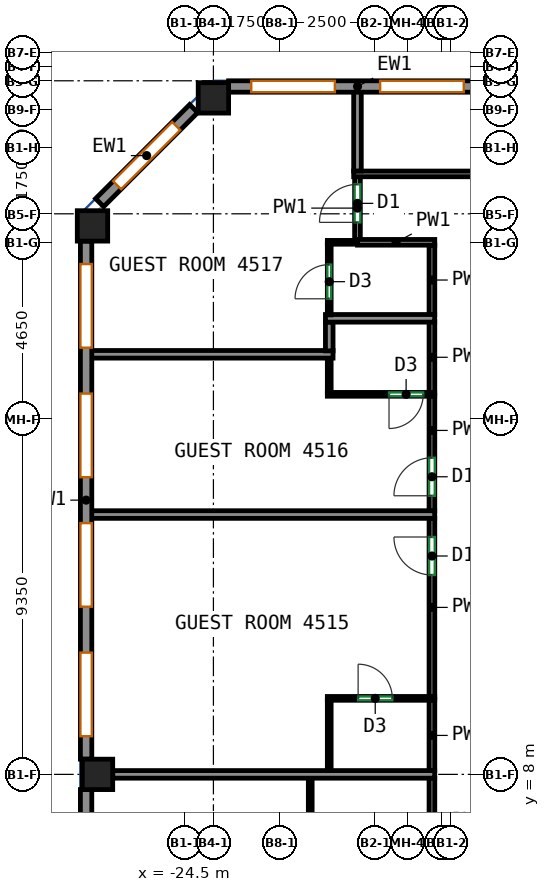
"""IFC4 building model, lengths in metres.
Left out: names, types, materials, properties, quantities, classifications, styles, units other than length and angle.
Written with IfcOpenShell. Run it as: python <this file> out.ifc"""

import sys

from ifc_helpers import new_model, si_unit, direction, frame, frame_2d, origin, origin_2d, place, context, subcontext, project, spatial, rectangle, extrude, source, transform, mapped, element, fill, save


model = new_model("IFC4")
c1 = context("Model", 3, precision=1e-05, world=origin(), true_north=direction((0.0, 1.0)))
c2 = subcontext(c1, "Body", "Model", "MODEL_VIEW")
j1 = project(units=[si_unit("LENGTHUNIT", "METRE"), si_unit("PLANEANGLEUNIT", "RADIAN")], contexts=[c1])
p1 = place(None, origin())
s1 = spatial("IfcSite", under=j1, at=p1, CompositionType="ELEMENT")
p2 = place(p1, origin())
s2 = spatial("IfcBuilding", under=s1, at=p2, CompositionType="ELEMENT")
p3 = place(p2, frame((0.0, 0.0, 188.9)))
s3 = spatial("IfcBuildingStorey", under=s2, at=p3, CompositionType="ELEMENT", Elevation=188.9)
m1 = source(origin(), c2, "Body", "SweptSolid", [
    extrude(rectangle(XDim=0.8, YDim=0.8, at=origin_2d()), origin(), (0.0, 0.0, 1.0), 3.12),
])
for number, where, z_axis, x_axis in (
    (1, (-26.932, 22.432, 0.0), (0.0, 0.0, 1.0), (1.0, 0.0, 0.0)),
    (2, (-26.8, 8.0, 0.0), (0.0, 0.0, 1.0), (1.0, 0.0, 0.0)),
    (3, (-23.75, 25.8, 0.0), (0.0, 0.0, 1.0), (1.0, 0.0, 0.0)),
):
    element("IfcColumn", number, at=place(p3, frame(where, z_axis=z_axis, x_axis=x_axis)), inside=s3, PredefinedType="COLUMN", context=c2, shape_type="MappedRepresentation", body=[
        mapped(m1, transform((0.0, 0.0, 0.0))),
    ])
m2 = source(origin(), c2, "Body", "SweptSolid", [
    extrude(rectangle(XDim=6.783, YDim=0.3, at=frame_2d((3.392, 0.0))), origin(), (0.0, 0.0, 1.0), 3.12),
])
p4 = place(p3, frame((-16.567, 26.1, 0.0), z_axis=(0.0, 0.0, 1.0), x_axis=(-1.0, 0.0, 0.0)))
e4 = element("IfcWall", 4, at=p4, inside=s3, PredefinedType="SOLIDWALL", context=c2, shape_type="MappedRepresentation", body=[
    mapped(m2, transform((0.0, 0.0, 0.0))),
])
p5 = place(p4, frame((0.596, 0.0, 0.85)))
e5 = element("IfcOpeningElement", 5, at=p5, cuts=e4, PredefinedType="OPENING", context=c2, shape_type="SweptSolid", body=[
    extrude(rectangle(XDim=2.2, YDim=1.95, at=frame_2d((1.1, 0.975))), frame((0.0, 0.16, 0.0), z_axis=(0.0, -1.0, 0.0), x_axis=(1.0, 0.0, 0.0)), (0.0, 0.0, 1.0), 0.32),
])
p6 = place(p4, frame((3.988, 0.0, 0.85)))
e6 = element("IfcOpeningElement", 6, at=p6, cuts=e4, PredefinedType="OPENING", context=c2, shape_type="SweptSolid", body=[
    extrude(rectangle(XDim=2.2, YDim=1.95, at=frame_2d((1.1, 0.975))), frame((0.0, 0.16, 0.0), z_axis=(0.0, -1.0, 0.0), x_axis=(1.0, 0.0, 0.0)), (0.0, 0.0, 1.0), 0.32),
])
m3 = source(origin(), c2, "Body", "SweptSolid", [
    extrude(rectangle(XDim=3.5, YDim=0.3, at=frame_2d((1.75, 0.0))), origin(), (0.0, 0.0, 1.0), 3.12),
])
p7 = place(p3, frame((-24.269, 25.519, 0.0), z_axis=(0.0, 0.0, 1.0), x_axis=(-0.707141656123, -0.70707190453, 0.0)))
e7 = element("IfcWall", 7, at=p7, inside=s3, PredefinedType="SOLIDWALL", context=c2, shape_type="MappedRepresentation", body=[
    mapped(m3, transform((0.0, 0.0, 0.0))),
])
p8 = place(p7, frame((0.65, 0.0, 0.85)))
e8 = element("IfcOpeningElement", 8, at=p8, cuts=e7, PredefinedType="OPENING", context=c2, shape_type="SweptSolid", body=[
    extrude(rectangle(XDim=2.2, YDim=1.95, at=frame_2d((1.1, 0.975))), frame((0.0, 0.16, 0.0), z_axis=(0.0, -1.0, 0.0), x_axis=(1.0, 0.0, 0.0)), (0.0, 0.0, 1.0), 0.32),
])
m4 = source(origin(), c2, "Body", "SweptSolid", [
    extrude(rectangle(XDim=13.632, YDim=0.3, at=frame_2d((6.816, 0.0))), origin(), (0.0, 0.0, 1.0), 3.12),
])
p9 = place(p3, frame((-27.1, 22.032, 0.0), z_axis=(0.0, 0.0, 1.0), x_axis=(0.0, -1.0, 0.0)))
e9 = element("IfcWall", 9, at=p9, inside=s3, PredefinedType="SOLIDWALL", context=c2, shape_type="MappedRepresentation", body=[
    mapped(m4, transform((0.0, 0.0, 0.0))),
])
p10 = place(p9, frame((0.604, 0.0, 0.85)))
e10 = element("IfcOpeningElement", 10, at=p10, cuts=e9, PredefinedType="OPENING", context=c2, shape_type="SweptSolid", body=[
    extrude(rectangle(XDim=2.2, YDim=1.95, at=frame_2d((1.1, 0.975))), frame((0.0, 0.16, 0.0), z_axis=(0.0, -1.0, 0.0), x_axis=(1.0, 0.0, 0.0)), (0.0, 0.0, 1.0), 0.32),
])
p11 = place(p9, frame((4.012, 0.0, 0.85)))
e11 = element("IfcOpeningElement", 11, at=p11, cuts=e9, PredefinedType="OPENING", context=c2, shape_type="SweptSolid", body=[
    extrude(rectangle(XDim=2.2, YDim=1.95, at=frame_2d((1.1, 0.975))), frame((0.0, 0.16, 0.0), z_axis=(0.0, -1.0, 0.0), x_axis=(1.0, 0.0, 0.0)), (0.0, 0.0, 1.0), 0.32),
])
p12 = place(p9, frame((7.42, 0.0, 0.85)))
e12 = element("IfcOpeningElement", 12, at=p12, cuts=e9, PredefinedType="OPENING", context=c2, shape_type="SweptSolid", body=[
    extrude(rectangle(XDim=2.2, YDim=1.95, at=frame_2d((1.1, 0.975))), frame((0.0, 0.16, 0.0), z_axis=(0.0, -1.0, 0.0), x_axis=(1.0, 0.0, 0.0)), (0.0, 0.0, 1.0), 0.32),
])
p13 = place(p9, frame((10.828, 0.0, 0.85)))
e13 = element("IfcOpeningElement", 13, at=p13, cuts=e9, PredefinedType="OPENING", context=c2, shape_type="SweptSolid", body=[
    extrude(rectangle(XDim=2.2, YDim=1.95, at=frame_2d((1.1, 0.975))), frame((0.0, 0.16, 0.0), z_axis=(0.0, -1.0, 0.0), x_axis=(1.0, 0.0, 0.0)), (0.0, 0.0, 1.0), 0.32),
])
m5 = source(origin(), c2, "Body", "SweptSolid", [
    extrude(rectangle(XDim=7.763, YDim=0.3, at=frame_2d((3.881, 0.0))), origin(), (0.0, 0.0, 1.0), 3.12),
])
p14 = place(p3, frame((-27.1, 7.6, 0.0), z_axis=(0.0, 0.0, 1.0), x_axis=(0.0, -1.0, 0.0)))
e14 = element("IfcWall", 14, at=p14, inside=s3, PredefinedType="SOLIDWALL", context=c2, shape_type="MappedRepresentation", body=[
    mapped(m5, transform((0.0, 0.0, 0.0))),
])
p15 = place(p14, frame((0.841, 0.0, 0.85)))
e15 = element("IfcOpeningElement", 15, at=p15, cuts=e14, PredefinedType="OPENING", context=c2, shape_type="SweptSolid", body=[
    extrude(rectangle(XDim=2.2, YDim=1.95, at=frame_2d((1.1, 0.975))), frame((0.0, 0.16, 0.0), z_axis=(0.0, -1.0, 0.0), x_axis=(1.0, 0.0, 0.0)), (0.0, 0.0, 1.0), 0.32),
])
p16 = place(p14, frame((4.722, 0.0, 0.85)))
e16 = element("IfcOpeningElement", 16, at=p16, cuts=e14, PredefinedType="OPENING", context=c2, shape_type="SweptSolid", body=[
    extrude(rectangle(XDim=2.2, YDim=1.95, at=frame_2d((1.1, 0.975))), frame((0.0, 0.16, 0.0), z_axis=(0.0, -1.0, 0.0), x_axis=(1.0, 0.0, 0.0)), (0.0, 0.0, 1.0), 0.32),
])
p17 = place(p3, frame((-18.0, 5.64, 0.0), z_axis=(0.0, 0.0, 1.0), x_axis=(0.0, 1.0, 0.0)))
e17 = element("IfcWall", 17, at=p17, inside=s3, PredefinedType="PARTITIONING", context=c2, shape_type="SweptSolid", body=[
    extrude(rectangle(XDim=2.27, YDim=0.15, at=frame_2d((1.135, 0.0))), origin(), (0.0, 0.0, 1.0), 3.12),
])
p18 = place(p3, frame((-18.0, 10.04, 0.0), z_axis=(0.0, 0.0, 1.0), x_axis=(0.0, 1.0, 0.0)))
e18 = element("IfcWall", 18, at=p18, inside=s3, PredefinedType="PARTITIONING", context=c2, shape_type="SweptSolid", body=[
    extrude(rectangle(XDim=4.707, YDim=0.15, at=frame_2d((2.354, 0.0))), origin(), (0.0, 0.0, 1.0), 3.12),
])
p19 = place(p18, frame((3.206, 0.0, 0.0)))
e19 = element("IfcOpeningElement", 19, at=p19, cuts=e18, PredefinedType="OPENING", context=c2, shape_type="SweptSolid", body=[
    extrude(rectangle(XDim=1.0, YDim=2.1, at=frame_2d((0.5, 1.05))), frame((0.0, 0.085, 0.0), z_axis=(0.0, -1.0, 0.0), x_axis=(1.0, 0.0, 0.0)), (0.0, 0.0, 1.0), 0.17),
])
p20 = place(p3, frame((-18.0, 8.09, 0.0), z_axis=(0.0, 0.0, 1.0), x_axis=(0.0, 1.0, 0.0)))
e20 = element("IfcWall", 20, at=p20, inside=s3, PredefinedType="PARTITIONING", context=c2, shape_type="SweptSolid", body=[
    extrude(rectangle(XDim=1.87, YDim=0.15, at=frame_2d((0.935, 0.0))), origin(), (0.0, 0.0, 1.0), 3.12),
])
p21 = place(p3, frame((-18.0, 14.927, 0.0), z_axis=(0.0, 0.0, 1.0), x_axis=(0.0, 1.0, 0.0)))
e21 = element("IfcWall", 21, at=p21, inside=s3, PredefinedType="PARTITIONING", context=c2, shape_type="SweptSolid", body=[
    extrude(rectangle(XDim=3.033, YDim=0.15, at=frame_2d((1.517, 0.0))), origin(), (0.0, 0.0, 1.0), 3.12),
])
p22 = place(p21, frame((0.404, 0.0, 0.0)))
e22 = element("IfcOpeningElement", 22, at=p22, cuts=e21, PredefinedType="OPENING", context=c2, shape_type="SweptSolid", body=[
    extrude(rectangle(XDim=1.0, YDim=2.1, at=frame_2d((0.5, 1.05))), frame((0.0, 0.085, 0.0), z_axis=(0.0, -1.0, 0.0), x_axis=(1.0, 0.0, 0.0)), (0.0, 0.0, 1.0), 0.17),
])
p23 = place(p3, frame((-18.0, 18.04, 0.0), z_axis=(0.0, 0.0, 1.0), x_axis=(0.0, 1.0, 0.0)))
e23 = element("IfcWall", 23, at=p23, inside=s3, PredefinedType="PARTITIONING", context=c2, shape_type="SweptSolid", body=[
    extrude(rectangle(XDim=1.87, YDim=0.15, at=frame_2d((0.935, 0.0))), origin(), (0.0, 0.0, 1.0), 3.12),
])
p24 = place(p3, frame((-19.959, 22.075, 0.0), z_axis=(0.0, 0.0, 1.0), x_axis=(0.0, 1.0, 0.0)))
e24 = element("IfcWall", 24, at=p24, inside=s3, PredefinedType="PARTITIONING", context=c2, shape_type="SweptSolid", body=[
    extrude(rectangle(XDim=1.65, YDim=0.15, at=frame_2d((0.825, 0.0))), origin(), (0.0, 0.0, 1.0), 3.12),
])
p25 = place(p24, frame((0.45, 0.0, 0.0)))
e25 = element("IfcOpeningElement", 25, at=p25, cuts=e24, PredefinedType="OPENING", context=c2, shape_type="SweptSolid", body=[
    extrude(rectangle(XDim=1.0, YDim=2.1, at=frame_2d((0.5, 1.05))), frame((0.0, 0.085, 0.0), z_axis=(0.0, -1.0, 0.0), x_axis=(1.0, 0.0, 0.0)), (0.0, 0.0, 1.0), 0.17),
])
p26 = place(p3, frame((-18.0, 20.09, 0.0), z_axis=(0.0, 0.0, 1.0), x_axis=(0.0, 1.0, 0.0)))
e26 = element("IfcWall", 26, at=p26, inside=s3, PredefinedType="PARTITIONING", context=c2, shape_type="SweptSolid", body=[
    extrude(rectangle(XDim=1.835, YDim=0.15, at=frame_2d((0.917, 0.0))), origin(), (0.0, 0.0, 1.0), 3.12),
])
p27 = place(p3, frame((-19.959, 22.0, 0.0), z_axis=(0.0, 0.0, 1.0), x_axis=(1.0, 0.0, 0.0)))
e27 = element("IfcWall", 27, at=p27, inside=s3, PredefinedType="PARTITIONING", context=c2, shape_type="SweptSolid", body=[
    extrude(rectangle(XDim=2.034, YDim=0.15, at=frame_2d((1.017, 0.0))), origin(), (0.0, 0.0, 1.0), 3.12),
])
p28 = place(p3, frame((-20.059, 23.8, 0.0), z_axis=(0.0, 0.0, 1.0), x_axis=(1.0, 0.0, 0.0)))
e28 = element("IfcWall", 28, at=p28, inside=s3, PredefinedType="PARTITIONING", context=c2, shape_type="SweptSolid", body=[
    extrude(rectangle(XDim=41.909, YDim=0.15, at=frame_2d((20.955, 0.0))), origin(), (0.0, 0.0, 1.0), 3.12),
])
p29 = place(p28, frame((4.718, 0.0, 0.0)))
e29 = element("IfcOpeningElement", 29, at=p29, cuts=e28, PredefinedType="OPENING", context=c2, shape_type="SweptSolid", body=[
    extrude(rectangle(XDim=0.9, YDim=2.1, at=frame_2d((0.45, 1.05))), frame((0.0, 0.085, 0.0), z_axis=(0.0, -1.0, 0.0), x_axis=(1.0, 0.0, 0.0)), (0.0, 0.0, 1.0), 0.17),
])
p30 = place(p28, frame((30.079, 0.0, 0.0)))
e30 = element("IfcOpeningElement", 30, at=p30, cuts=e28, PredefinedType="OPENING", context=c2, shape_type="SweptSolid", body=[
    extrude(rectangle(XDim=1.0, YDim=2.1, at=frame_2d((0.5, 1.05))), frame((0.0, 0.085, 0.0), z_axis=(0.0, -1.0, 0.0), x_axis=(1.0, 0.0, 0.0)), (0.0, 0.0, 1.0), 0.17),
])
p31 = place(p3, frame((-21.202, 5.65, 0.0), z_axis=(0.0, 0.0, 1.0), x_axis=(0.0, 1.0, 0.0)))
e31 = element("IfcWall", 31, at=p31, inside=s3, PredefinedType="PARTITIONING", context=c2, shape_type="SweptSolid", body=[
    extrude(rectangle(XDim=2.25, YDim=0.1, at=frame_2d((1.125, 0.0))), origin(), (0.0, 0.0, 1.0), 3.12),
])
p32 = place(p3, frame((-26.4, 8.0, 0.0), z_axis=(0.0, 0.0, 1.0), x_axis=(1.0, 0.0, 0.0)))
e32 = element("IfcWall", 32, at=p32, inside=s3, PredefinedType="PARTITIONING", context=c2, shape_type="SweptSolid", body=[
    extrude(rectangle(XDim=8.473, YDim=0.2, at=frame_2d((4.236, 0.0))), origin(), (0.0, 0.0, 1.0), 3.12),
])
p33 = place(p3, frame((-20.752, 10.0, 0.0), z_axis=(0.0, 0.0, 1.0), x_axis=(1.0, 0.0, 0.0)))
e33 = element("IfcWall", 33, at=p33, inside=s3, PredefinedType="PARTITIONING", context=c2, shape_type="SweptSolid", body=[
    extrude(rectangle(XDim=2.825, YDim=0.1, at=frame_2d((1.413, 0.0))), origin(), (0.0, 0.0, 1.0), 3.12),
])
p34 = place(p33, frame((0.81, 0.0, 0.0)))
e34 = element("IfcOpeningElement", 34, at=p34, cuts=e33, PredefinedType="OPENING", context=c2, shape_type="SweptSolid", body=[
    extrude(rectangle(XDim=0.9, YDim=2.1, at=frame_2d((0.45, 1.05))), frame((0.0, 0.06, 0.0), z_axis=(0.0, -1.0, 0.0), x_axis=(1.0, 0.0, 0.0)), (0.0, 0.0, 1.0), 0.12),
])
p35 = place(p3, frame((-20.702, 8.1, 0.0), z_axis=(0.0, 0.0, 1.0), x_axis=(0.0, 1.0, 0.0)))
e35 = element("IfcWall", 35, at=p35, inside=s3, PredefinedType="PARTITIONING", context=c2, shape_type="SweptSolid", body=[
    extrude(rectangle(XDim=1.85, YDim=0.1, at=frame_2d((0.925, 0.0))), origin(), (0.0, 0.0, 1.0), 3.12),
])
p36 = place(p3, frame((-17.927, 14.837, 0.0), z_axis=(0.0, 0.0, 1.0), x_axis=(-1.0, 0.0, 0.0)))
e36 = element("IfcWall", 36, at=p36, inside=s3, PredefinedType="PARTITIONING", context=c2, shape_type="SweptSolid", body=[
    extrude(rectangle(XDim=9.073, YDim=0.2, at=frame_2d((4.537, 0.0))), origin(), (0.0, 0.0, 1.0), 3.12),
])
p37 = place(p3, frame((-17.927, 18.0, 0.0), z_axis=(0.0, 0.0, 1.0), x_axis=(-1.0, 0.0, 0.0)))
e37 = element("IfcWall", 37, at=p37, inside=s3, PredefinedType="PARTITIONING", context=c2, shape_type="SweptSolid", body=[
    extrude(rectangle(XDim=2.825, YDim=0.1, at=frame_2d((1.413, 0.0))), origin(), (0.0, 0.0, 1.0), 3.12),
])
p38 = place(p37, frame((0.302, 0.0, 0.0)))
e38 = element("IfcOpeningElement", 38, at=p38, cuts=e37, PredefinedType="OPENING", context=c2, shape_type="SweptSolid", body=[
    extrude(rectangle(XDim=0.9, YDim=2.1, at=frame_2d((0.45, 1.05))), frame((0.0, 0.06, 0.0), z_axis=(0.0, -1.0, 0.0), x_axis=(1.0, 0.0, 0.0)), (0.0, 0.0, 1.0), 0.12),
])
p39 = place(p3, frame((-20.702, 18.05, 0.0), z_axis=(0.0, 0.0, 1.0), x_axis=(0.0, 1.0, 0.0)))
e39 = element("IfcWall", 39, at=p39, inside=s3, PredefinedType="PARTITIONING", context=c2, shape_type="SweptSolid", body=[
    extrude(rectangle(XDim=0.903, YDim=0.1, at=frame_2d((0.451, 0.0))), origin(), (0.0, 0.0, 1.0), 3.12),
])
p40 = place(p3, frame((-20.602, 19.053, 0.0), z_axis=(0.0, 0.0, 1.0), x_axis=(-1.0, 0.0, 0.0)))
e40 = element("IfcWall", 40, at=p40, inside=s3, PredefinedType="PARTITIONING", context=c2, shape_type="SweptSolid", body=[
    extrude(rectangle(XDim=6.398, YDim=0.2, at=frame_2d((3.199, 0.0))), origin(), (0.0, 0.0, 1.0), 3.12),
])
p41 = place(p3, frame((-20.702, 19.9, 0.0), z_axis=(0.0, 0.0, 1.0), x_axis=(0.0, -1.0, 0.0)))
e41 = element("IfcWall", 41, at=p41, inside=s3, PredefinedType="PARTITIONING", context=c2, shape_type="SweptSolid", body=[
    extrude(rectangle(XDim=0.757, YDim=0.2, at=frame_2d((0.378, 0.0))), origin(), (0.0, 0.0, 1.0), 3.12),
])
p42 = place(p3, frame((-17.927, 20.0, 0.0), z_axis=(0.0, 0.0, 1.0), x_axis=(-1.0, 0.0, 0.0)))
e42 = element("IfcWall", 42, at=p42, inside=s3, PredefinedType="PARTITIONING", context=c2, shape_type="SweptSolid", body=[
    extrude(rectangle(XDim=2.875, YDim=0.2, at=frame_2d((1.438, 0.0))), origin(), (0.0, 0.0, 1.0), 3.12),
])
p43 = place(p3, frame((-20.752, 22.0, 0.0), z_axis=(0.0, 0.0, 1.0), x_axis=(1.0, 0.0, 0.0)))
e43 = element("IfcWall", 43, at=p43, inside=s3, PredefinedType="PARTITIONING", context=c2, shape_type="SweptSolid", body=[
    extrude(rectangle(XDim=0.791, YDim=0.1, at=frame_2d((0.396, 0.0))), origin(), (0.0, 0.0, 1.0), 3.12),
])
p44 = place(p3, frame((-20.702, 20.09, 0.0), z_axis=(0.0, 0.0, 1.0), x_axis=(0.0, 1.0, 0.0)))
e44 = element("IfcWall", 44, at=p44, inside=s3, PredefinedType="PARTITIONING", context=c2, shape_type="SweptSolid", body=[
    extrude(rectangle(XDim=1.86, YDim=0.1, at=frame_2d((0.93, 0.0))), origin(), (0.0, 0.0, 1.0), 3.12),
])
p45 = place(p44, frame((0.424, 0.0, 0.0)))
e45 = element("IfcOpeningElement", 45, at=p45, cuts=e44, PredefinedType="OPENING", context=c2, shape_type="SweptSolid", body=[
    extrude(rectangle(XDim=0.9, YDim=2.1, at=frame_2d((0.45, 1.05))), frame((0.0, 0.06, 0.0), z_axis=(0.0, -1.0, 0.0), x_axis=(1.0, 0.0, 0.0)), (0.0, 0.0, 1.0), 0.12),
])
p46 = place(p3, frame((-19.959, 23.877, 0.0), z_axis=(0.0, 0.0, 1.0), x_axis=(0.0, 1.0, 0.0)))
e46 = element("IfcWall", 46, at=p46, inside=s3, PredefinedType="PARTITIONING", context=c2, shape_type="SweptSolid", body=[
    extrude(rectangle(XDim=2.123, YDim=0.2, at=frame_2d((1.062, 0.0))), origin(), (0.0, 0.0, 1.0), 3.12),
])
p47 = place(p5, origin())
e47 = element("IfcWindow", 47, at=p47, inside=s3, PartitioningType="SINGLE_PANEL", PredefinedType="WINDOW", context=c2, shape_type="SweptSolid", body=[
    extrude(rectangle(XDim=2.2, YDim=1.95, at=frame_2d((1.1, 0.975))), frame((0.0, 0.03, 0.0), z_axis=(0.0, -1.0, 0.0), x_axis=(1.0, 0.0, 0.0)), (0.0, 0.0, 1.0), 0.06),
])
fill(e5, e47)
p48 = place(p6, origin())
e48 = element("IfcWindow", 48, at=p48, inside=s3, PartitioningType="SINGLE_PANEL", PredefinedType="WINDOW", context=c2, shape_type="SweptSolid", body=[
    extrude(rectangle(XDim=2.2, YDim=1.95, at=frame_2d((1.1, 0.975))), frame((0.0, 0.03, 0.0), z_axis=(0.0, -1.0, 0.0), x_axis=(1.0, 0.0, 0.0)), (0.0, 0.0, 1.0), 0.06),
])
fill(e6, e48)
p49 = place(p8, origin())
e49 = element("IfcWindow", 49, at=p49, inside=s3, PartitioningType="SINGLE_PANEL", PredefinedType="WINDOW", context=c2, shape_type="SweptSolid", body=[
    extrude(rectangle(XDim=2.2, YDim=1.95, at=frame_2d((1.1, 0.975))), frame((0.0, 0.03, 0.0), z_axis=(0.0, -1.0, 0.0), x_axis=(1.0, 0.0, 0.0)), (0.0, 0.0, 1.0), 0.06),
])
fill(e8, e49)
p50 = place(p10, origin())
e50 = element("IfcWindow", 50, at=p50, inside=s3, PartitioningType="SINGLE_PANEL", PredefinedType="WINDOW", context=c2, shape_type="SweptSolid", body=[
    extrude(rectangle(XDim=2.2, YDim=1.95, at=frame_2d((1.1, 0.975))), frame((0.0, 0.03, 0.0), z_axis=(0.0, -1.0, 0.0), x_axis=(1.0, 0.0, 0.0)), (0.0, 0.0, 1.0), 0.06),
])
fill(e10, e50)
p51 = place(p11, origin())
e51 = element("IfcWindow", 51, at=p51, inside=s3, PartitioningType="SINGLE_PANEL", PredefinedType="WINDOW", context=c2, shape_type="SweptSolid", body=[
    extrude(rectangle(XDim=2.2, YDim=1.95, at=frame_2d((1.1, 0.975))), frame((0.0, 0.03, 0.0), z_axis=(0.0, -1.0, 0.0), x_axis=(1.0, 0.0, 0.0)), (0.0, 0.0, 1.0), 0.06),
])
fill(e11, e51)
p52 = place(p12, origin())
e52 = element("IfcWindow", 52, at=p52, inside=s3, PartitioningType="SINGLE_PANEL", PredefinedType="WINDOW", context=c2, shape_type="SweptSolid", body=[
    extrude(rectangle(XDim=2.2, YDim=1.95, at=frame_2d((1.1, 0.975))), frame((0.0, 0.03, 0.0), z_axis=(0.0, -1.0, 0.0), x_axis=(1.0, 0.0, 0.0)), (0.0, 0.0, 1.0), 0.06),
])
fill(e12, e52)
p53 = place(p13, origin())
e53 = element("IfcWindow", 53, at=p53, inside=s3, PartitioningType="SINGLE_PANEL", PredefinedType="WINDOW", context=c2, shape_type="SweptSolid", body=[
    extrude(rectangle(XDim=2.2, YDim=1.95, at=frame_2d((1.1, 0.975))), frame((0.0, 0.03, 0.0), z_axis=(0.0, -1.0, 0.0), x_axis=(1.0, 0.0, 0.0)), (0.0, 0.0, 1.0), 0.06),
])
fill(e13, e53)
p54 = place(p34, origin())
e54 = element("IfcDoor", 54, at=p54, inside=s3, OperationType="SINGLE_SWING_LEFT", PredefinedType="DOOR", context=c2, shape_type="SweptSolid", body=[
    extrude(rectangle(XDim=0.9, YDim=2.1, at=frame_2d((0.45, 1.05))), frame((0.0, 0.025, 0.0), z_axis=(0.0, -1.0, 0.0), x_axis=(1.0, 0.0, 0.0)), (0.0, 0.0, 1.0), 0.05),
])
fill(e34, e54)
p55 = place(p19, origin())
e55 = element("IfcDoor", 55, at=p55, inside=s3, OperationType="SINGLE_SWING_RIGHT", PredefinedType="DOOR", context=c2, shape_type="SweptSolid", body=[
    extrude(rectangle(XDim=1.0, YDim=2.1, at=frame_2d((0.5, 1.05))), frame((0.0, 0.025, 0.0), z_axis=(0.0, -1.0, 0.0), x_axis=(1.0, 0.0, 0.0)), (0.0, 0.0, 1.0), 0.05),
])
fill(e19, e55)
p56 = place(p22, origin())
e56 = element("IfcDoor", 56, at=p56, inside=s3, OperationType="SINGLE_SWING_LEFT", PredefinedType="DOOR", context=c2, shape_type="SweptSolid", body=[
    extrude(rectangle(XDim=1.0, YDim=2.1, at=frame_2d((0.5, 1.05))), frame((0.0, 0.025, 0.0), z_axis=(0.0, -1.0, 0.0), x_axis=(1.0, 0.0, 0.0)), (0.0, 0.0, 1.0), 0.05),
])
fill(e22, e56)
p57 = place(p38, origin())
e57 = element("IfcDoor", 57, at=p57, inside=s3, OperationType="SINGLE_SWING_RIGHT", PredefinedType="DOOR", context=c2, shape_type="SweptSolid", body=[
    extrude(rectangle(XDim=0.9, YDim=2.1, at=frame_2d((0.45, 1.05))), frame((0.0, 0.025, 0.0), z_axis=(0.0, -1.0, 0.0), x_axis=(1.0, 0.0, 0.0)), (0.0, 0.0, 1.0), 0.05),
])
fill(e38, e57)
p58 = place(p45, origin())
e58 = element("IfcDoor", 58, at=p58, inside=s3, OperationType="SINGLE_SWING_LEFT", PredefinedType="DOOR", context=c2, shape_type="SweptSolid", body=[
    extrude(rectangle(XDim=0.9, YDim=2.1, at=frame_2d((0.45, 1.05))), frame((0.0, 0.025, 0.0), z_axis=(0.0, -1.0, 0.0), x_axis=(1.0, 0.0, 0.0)), (0.0, 0.0, 1.0), 0.05),
])
fill(e45, e58)
p59 = place(p25, origin())
e59 = element("IfcDoor", 59, at=p59, inside=s3, OperationType="SINGLE_SWING_LEFT", PredefinedType="DOOR", context=c2, shape_type="SweptSolid", body=[
    extrude(rectangle(XDim=1.0, YDim=2.1, at=frame_2d((0.5, 1.05))), frame((0.0, 0.025, 0.0), z_axis=(0.0, -1.0, 0.0), x_axis=(1.0, 0.0, 0.0)), (0.0, 0.0, 1.0), 0.05),
])
fill(e25, e59)
save(model, sys.argv[1])
